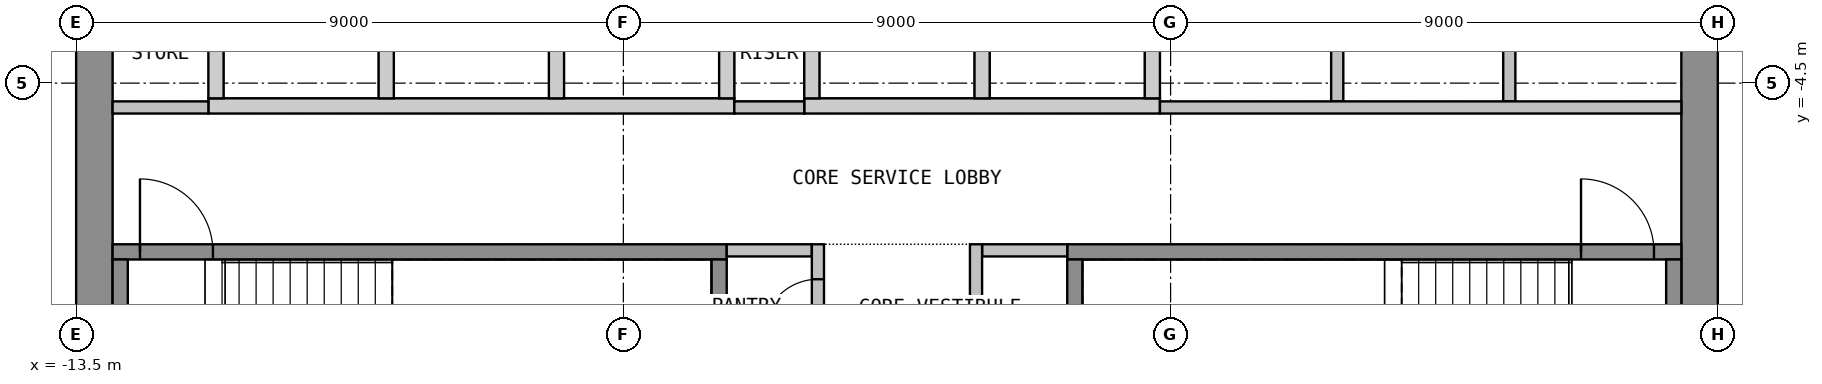
"""IFC4 building model, lengths in metres.
Left out: names, types, materials, properties, quantities, classifications, styles, units other than length and angle.
Written with IfcOpenShell. Run it as: python <this file> out.ifc"""

import sys

from ifc_helpers import new_model, si_unit, direction, frame, frame_2d, origin, place, context, subcontext, project, spatial, polyline, rectangle, outline, extrude, element, fill, save


model = new_model("IFC4")
c1 = context("Model", 3, precision=1e-05, world=origin(), true_north=direction((0.0, 1.0)))
c2 = subcontext(c1, "Body", "Model", "MODEL_VIEW")
j1 = project(units=[si_unit("LENGTHUNIT", "METRE"), si_unit("PLANEANGLEUNIT", "RADIAN")], contexts=[c1])
p1 = place(None, origin())
s1 = spatial("IfcSite", under=j1, at=p1, CompositionType="ELEMENT")
p2 = place(p1, origin())
s2 = spatial("IfcBuilding", under=s1, at=p2, CompositionType="ELEMENT")
p3 = place(p2, frame((0.0, 0.0, 286.5)))
s3 = spatial("IfcBuildingStorey", under=s2, at=p3, CompositionType="ELEMENT", Elevation=286.5)
p4 = place(p3, frame((-13.2, -10.65, 0.0), z_axis=(0.0, 0.0, 1.0), x_axis=(0.0, 1.0, 0.0)))
e1 = element("IfcWall", 1, at=p4, inside=s3, PredefinedType="SHEAR", context=c2, shape_type="SweptSolid", body=[
    extrude(rectangle(XDim=21.3, YDim=0.6, at=frame_2d((10.65, 0.0))), origin(), (0.0, 0.0, 1.0), 3.575),
])
p5 = place(p4, frame((9.45, 0.0, 0.0)))
e2 = element("IfcOpeningElement", 2, at=p5, cuts=e1, PredefinedType="OPENING", context=c2, shape_type="SweptSolid", body=[
    extrude(rectangle(XDim=2.4, YDim=2.1, at=frame_2d((1.2, 1.05))), frame((0.0, 0.31, 0.0), z_axis=(0.0, -1.0, 0.0), x_axis=(1.0, 0.0, 0.0)), (0.0, 0.0, 1.0), 0.62),
])
p6 = place(p3, frame((13.2, -10.65, 0.0), z_axis=(0.0, 0.0, 1.0), x_axis=(0.0, 1.0, 0.0)))
e3 = element("IfcWall", 3, at=p6, inside=s3, PredefinedType="SHEAR", context=c2, shape_type="SweptSolid", body=[
    extrude(rectangle(XDim=21.3, YDim=0.6, at=frame_2d((10.65, 0.0))), origin(), (0.0, 0.0, 1.0), 3.575),
])
p7 = place(p6, frame((9.45, 0.0, 0.0)))
e4 = element("IfcOpeningElement", 4, at=p7, cuts=e3, PredefinedType="OPENING", context=c2, shape_type="SweptSolid", body=[
    extrude(rectangle(XDim=2.4, YDim=2.1, at=frame_2d((1.2, 1.05))), frame((0.0, 0.31, 0.0), z_axis=(0.0, -1.0, 0.0), x_axis=(1.0, 0.0, 0.0)), (0.0, 0.0, 1.0), 0.62),
])
p8 = place(p3, origin())
e5 = element("IfcWall", 5, at=p8, inside=s3, PredefinedType="SHEAR", context=c2, shape_type="SweptSolid", body=[
    extrude(outline(polyline([(-11.325, -5.0), (-2.675, -5.0), (-2.675, -4.75), (-11.325, -4.75), (-11.325, -5.0)])), origin(), (0.0, 0.0, 1.0), 3.575),
])
p9 = place(p3, origin())
e6 = element("IfcWall", 6, at=p9, inside=s3, PredefinedType="SHEAR", context=c2, shape_type="SweptSolid", body=[
    extrude(outline(polyline([(-1.525, -5.0), (4.325, -5.0), (4.325, -4.75), (-1.525, -4.75), (-1.525, -5.0)])), origin(), (0.0, 0.0, 1.0), 3.575),
])
p10 = place(p3, origin())
e7 = element("IfcWall", 7, at=p10, inside=s3, PredefinedType="SHEAR", context=c2, shape_type="SweptSolid", body=[
    extrude(outline(polyline([(-11.325, -4.75), (-11.075, -4.75), (-11.075, -2.05), (-11.325, -2.05), (-11.325, -4.75)])), origin(), (0.0, 0.0, 1.0), 3.575),
])
p11 = place(p3, origin())
e8 = element("IfcWall", 8, at=p11, inside=s3, PredefinedType="SHEAR", context=c2, shape_type="SweptSolid", body=[
    extrude(outline(polyline([(-8.525, -4.75), (-8.275, -4.75), (-8.275, -2.05), (-8.525, -2.05), (-8.525, -4.75)])), origin(), (0.0, 0.0, 1.0), 3.575),
])
p12 = place(p3, origin())
e9 = element("IfcWall", 9, at=p12, inside=s3, PredefinedType="SHEAR", context=c2, shape_type="SweptSolid", body=[
    extrude(outline(polyline([(-5.725, -4.75), (-5.475, -4.75), (-5.475, -2.05), (-5.725, -2.05), (-5.725, -4.75)])), origin(), (0.0, 0.0, 1.0), 3.575),
])
p13 = place(p3, origin())
e10 = element("IfcWall", 10, at=p13, inside=s3, PredefinedType="SHEAR", context=c2, shape_type="SweptSolid", body=[
    extrude(outline(polyline([(-2.925, -4.75), (-2.675, -4.75), (-2.675, -2.05), (-2.925, -2.05), (-2.925, -4.75)])), origin(), (0.0, 0.0, 1.0), 3.575),
])
p14 = place(p3, origin())
e11 = element("IfcWall", 11, at=p14, inside=s3, PredefinedType="SHEAR", context=c2, shape_type="SweptSolid", body=[
    extrude(outline(polyline([(-1.525, -4.75), (-1.275, -4.75), (-1.275, -2.05), (-1.525, -2.05), (-1.525, -4.75)])), origin(), (0.0, 0.0, 1.0), 3.575),
])
p15 = place(p3, origin())
e12 = element("IfcWall", 12, at=p15, inside=s3, PredefinedType="SHEAR", context=c2, shape_type="SweptSolid", body=[
    extrude(outline(polyline([(1.275, -4.75), (1.525, -4.75), (1.525, -2.05), (1.275, -2.05), (1.275, -4.75)])), origin(), (0.0, 0.0, 1.0), 3.575),
])
p16 = place(p3, origin())
e13 = element("IfcWall", 13, at=p16, inside=s3, PredefinedType="SHEAR", context=c2, shape_type="SweptSolid", body=[
    extrude(outline(polyline([(4.075, -4.75), (4.325, -4.75), (4.325, -2.05), (4.075, -2.05), (4.075, -4.75)])), origin(), (0.0, 0.0, 1.0), 3.575),
])
p17 = place(p3, frame((-12.9, -7.275, 0.0), z_axis=(0.0, 0.0, 1.0), x_axis=(1.0, 0.0, 0.0)))
e14 = element("IfcWall", 14, at=p17, inside=s3, PredefinedType="SHEAR", context=c2, shape_type="SweptSolid", body=[
    extrude(rectangle(XDim=10.1, YDim=0.25, at=frame_2d((5.05, 0.0))), origin(), (0.0, 0.0, 1.0), 3.575),
])
p18 = place(p17, frame((0.45, 0.0, 0.0)))
e15 = element("IfcOpeningElement", 15, at=p18, cuts=e14, PredefinedType="OPENING", context=c2, shape_type="SweptSolid", body=[
    extrude(rectangle(XDim=1.2, YDim=2.1, at=frame_2d((0.6, 1.05))), frame((0.0, 0.135, 0.0), z_axis=(0.0, -1.0, 0.0), x_axis=(1.0, 0.0, 0.0)), (0.0, 0.0, 1.0), 0.27),
])
for number, where, z_axis, x_axis in (
    (16, (-12.775, -10.65, 0.0), (0.0, 0.0, 1.0), (0.0, 1.0, 0.0)),
    (17, (-2.925, -10.65, 0.0), (0.0, 0.0, 1.0), (0.0, 1.0, 0.0)),
):
    element("IfcWall", number, at=place(p3, frame(where, z_axis=z_axis, x_axis=x_axis)), inside=s3, PredefinedType="SHEAR", context=c2, shape_type="SweptSolid", body=[
        extrude(rectangle(XDim=3.25, YDim=0.25, at=frame_2d((1.625, 0.0))), origin(), (0.0, 0.0, 1.0), 3.575),
    ])
p19 = place(p3, frame((2.8, -7.275, 0.0), z_axis=(0.0, 0.0, 1.0), x_axis=(1.0, 0.0, 0.0)))
e18 = element("IfcWall", 18, at=p19, inside=s3, PredefinedType="SHEAR", context=c2, shape_type="SweptSolid", body=[
    extrude(rectangle(XDim=10.1, YDim=0.25, at=frame_2d((5.05, 0.0))), origin(), (0.0, 0.0, 1.0), 3.575),
])
p20 = place(p19, frame((8.45, 0.0, 0.0)))
e19 = element("IfcOpeningElement", 19, at=p20, cuts=e18, PredefinedType="OPENING", context=c2, shape_type="SweptSolid", body=[
    extrude(rectangle(XDim=1.2, YDim=2.1, at=frame_2d((0.6, 1.05))), frame((0.0, 0.135, 0.0), z_axis=(0.0, -1.0, 0.0), x_axis=(1.0, 0.0, 0.0)), (0.0, 0.0, 1.0), 0.27),
])
for number, where, z_axis, x_axis in (
    (20, (2.925, -10.65, 0.0), (0.0, 0.0, 1.0), (0.0, 1.0, 0.0)),
    (21, (12.775, -10.65, 0.0), (0.0, 0.0, 1.0), (0.0, 1.0, 0.0)),
):
    element("IfcWall", number, at=place(p3, frame(where, z_axis=z_axis, x_axis=x_axis)), inside=s3, PredefinedType="SHEAR", context=c2, shape_type="SweptSolid", body=[
        extrude(rectangle(XDim=3.25, YDim=0.25, at=frame_2d((1.625, 0.0))), origin(), (0.0, 0.0, 1.0), 3.575),
    ])
for number, where, z_axis, x_axis in (
    (22, (-2.8, -7.25, 0.0), (0.0, 0.0, 1.0), (1.0, 0.0, 0.0)),
    (23, (1.4, -7.25, 0.0), (0.0, 0.0, 1.0), (1.0, 0.0, 0.0)),
):
    element("IfcWall", number, at=place(p3, frame(where, z_axis=z_axis, x_axis=x_axis)), inside=s3, PredefinedType="PARTITIONING", context=c2, shape_type="SweptSolid", body=[
        extrude(rectangle(XDim=1.4, YDim=0.2, at=frame_2d((0.7, 0.0))), origin(), (0.0, 0.0, 1.0), 3.575),
    ])
p21 = place(p3, frame((-1.3, -10.65, 0.0), z_axis=(0.0, 0.0, 1.0), x_axis=(0.0, 1.0, 0.0)))
e24 = element("IfcWall", 24, at=p21, inside=s3, PredefinedType="PARTITIONING", context=c2, shape_type="SweptSolid", body=[
    extrude(rectangle(XDim=3.5, YDim=0.2, at=frame_2d((1.75, 0.0))), origin(), (0.0, 0.0, 1.0), 3.575),
])
p22 = place(p21, frame((0.375, 0.0, 0.0)))
e25 = element("IfcOpeningElement", 25, at=p22, cuts=e24, PredefinedType="OPENING", context=c2, shape_type="SweptSolid", body=[
    extrude(rectangle(XDim=0.9, YDim=2.1, at=frame_2d((0.45, 1.05))), frame((0.0, 0.11, 0.0), z_axis=(0.0, -1.0, 0.0), x_axis=(1.0, 0.0, 0.0)), (0.0, 0.0, 1.0), 0.22),
])
p23 = place(p21, frame((2.025, 0.0, 0.0)))
e26 = element("IfcOpeningElement", 26, at=p23, cuts=e24, PredefinedType="OPENING", context=c2, shape_type="SweptSolid", body=[
    extrude(rectangle(XDim=0.9, YDim=2.1, at=frame_2d((0.45, 1.05))), frame((0.0, 0.11, 0.0), z_axis=(0.0, -1.0, 0.0), x_axis=(1.0, 0.0, 0.0)), (0.0, 0.0, 1.0), 0.22),
])
p24 = place(p3, frame((1.3, -10.65, 0.0), z_axis=(0.0, 0.0, 1.0), x_axis=(0.0, 1.0, 0.0)))
e27 = element("IfcWall", 27, at=p24, inside=s3, PredefinedType="PARTITIONING", context=c2, shape_type="SweptSolid", body=[
    extrude(rectangle(XDim=3.5, YDim=0.2, at=frame_2d((1.75, 0.0))), origin(), (0.0, 0.0, 1.0), 3.575),
])
p25 = place(p24, frame((1.2, 0.0, 0.0)))
e28 = element("IfcOpeningElement", 28, at=p25, cuts=e27, PredefinedType="OPENING", context=c2, shape_type="SweptSolid", body=[
    extrude(rectangle(XDim=0.9, YDim=2.1, at=frame_2d((0.45, 1.05))), frame((0.0, 0.11, 0.0), z_axis=(0.0, -1.0, 0.0), x_axis=(1.0, 0.0, 0.0)), (0.0, 0.0, 1.0), 0.22),
])
p26 = place(p3, frame((-12.9, -4.9, 0.0), z_axis=(0.0, 0.0, 1.0), x_axis=(1.0, 0.0, 0.0)))
e29 = element("IfcWall", 29, at=p26, inside=s3, PredefinedType="PARTITIONING", context=c2, shape_type="SweptSolid", body=[
    extrude(rectangle(XDim=1.575, YDim=0.2, at=frame_2d((0.788, 0.0))), origin(), (0.0, 0.0, 1.0), 3.575),
])
p27 = place(p3, frame((-2.675, -4.9, 0.0), z_axis=(0.0, 0.0, 1.0), x_axis=(1.0, 0.0, 0.0)))
e30 = element("IfcWall", 30, at=p27, inside=s3, PredefinedType="PARTITIONING", context=c2, shape_type="SweptSolid", body=[
    extrude(rectangle(XDim=1.15, YDim=0.2, at=frame_2d((0.575, 0.0))), origin(), (0.0, 0.0, 1.0), 3.575),
])
for number, where, z_axis, x_axis in (
    (31, (7.24, -4.8, 0.0), (0.0, 0.0, 1.0), (0.0, 1.0, 0.0)),
    (32, (10.07, -4.8, 0.0), (0.0, 0.0, 1.0), (0.0, 1.0, 0.0)),
):
    element("IfcWall", number, at=place(p3, frame(where, z_axis=z_axis, x_axis=x_axis)), inside=s3, PredefinedType="PARTITIONING", context=c2, shape_type="SweptSolid", body=[
        extrude(rectangle(XDim=2.8, YDim=0.2, at=frame_2d((1.4, 0.0))), origin(), (0.0, 0.0, 1.0), 3.575),
    ])
p28 = place(p3, frame((4.325, -4.9, 0.0), z_axis=(0.0, 0.0, 1.0), x_axis=(1.0, 0.0, 0.0)))
e33 = element("IfcWall", 33, at=p28, inside=s3, PredefinedType="PARTITIONING", context=c2, shape_type="SweptSolid", body=[
    extrude(rectangle(XDim=8.575, YDim=0.2, at=frame_2d((4.288, 0.0))), origin(), (0.0, 0.0, 1.0), 3.575),
])
p29 = place(p18, origin())
e34 = element("IfcDoor", 34, at=p29, inside=s3, OperationType="SINGLE_SWING_LEFT", PredefinedType="DOOR", context=c2, shape_type="SweptSolid", body=[
    extrude(rectangle(XDim=1.2, YDim=2.1, at=frame_2d((0.6, 1.05))), frame((0.0, 0.025, 0.0), z_axis=(0.0, -1.0, 0.0), x_axis=(1.0, 0.0, 0.0)), (0.0, 0.0, 1.0), 0.05),
])
fill(e15, e34)
p30 = place(p20, origin())
e35 = element("IfcDoor", 35, at=p30, inside=s3, OperationType="SINGLE_SWING_LEFT", PredefinedType="DOOR", context=c2, shape_type="SweptSolid", body=[
    extrude(rectangle(XDim=1.2, YDim=2.1, at=frame_2d((0.6, 1.05))), frame((0.0, 0.025, 0.0), z_axis=(0.0, -1.0, 0.0), x_axis=(1.0, 0.0, 0.0)), (0.0, 0.0, 1.0), 0.05),
])
fill(e19, e35)
p31 = place(p23, origin())
e36 = element("IfcDoor", 36, at=p31, inside=s3, OperationType="SINGLE_SWING_LEFT", PredefinedType="DOOR", context=c2, shape_type="SweptSolid", body=[
    extrude(rectangle(XDim=0.9, YDim=2.1, at=frame_2d((0.45, 1.05))), frame((0.0, 0.025, 0.0), z_axis=(0.0, -1.0, 0.0), x_axis=(1.0, 0.0, 0.0)), (0.0, 0.0, 1.0), 0.05),
])
fill(e26, e36)
save(model, sys.argv[1])
